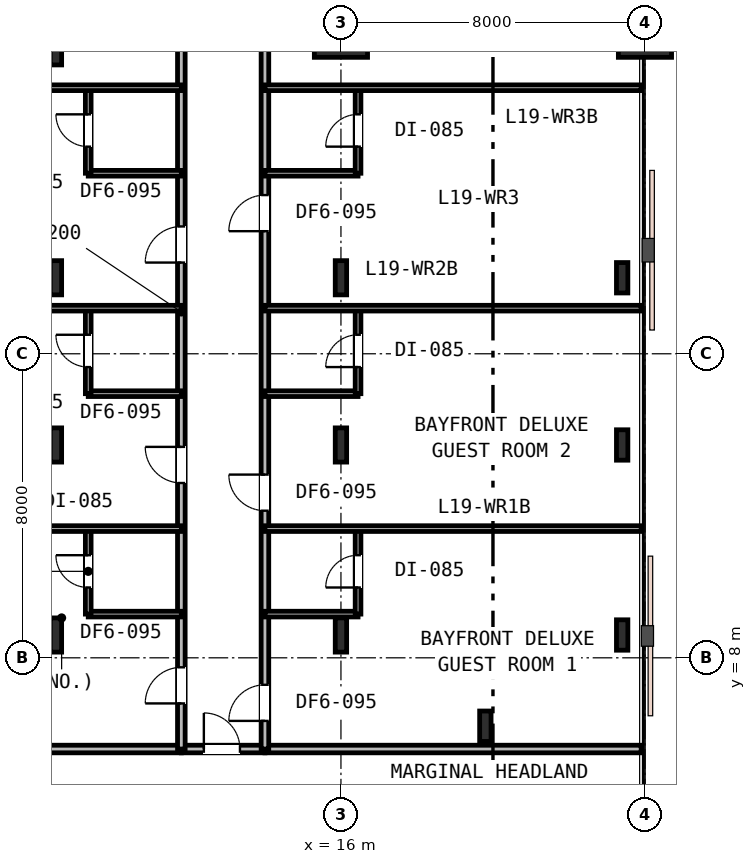
"""IFC4 building model, lengths in metres.
Left out: names, types, materials, properties, quantities, classifications, styles, units other than length and angle.
Written with IfcOpenShell. Run it as: python <this file> out.ifc"""

import sys

from ifc_helpers import new_model, si_unit, direction, frame, frame_2d, origin, origin_2d, place, context, subcontext, project, spatial, rectangle, i_section, extrude, element, fill, save


model = new_model("IFC4")
c1 = context("Model", 3, precision=1e-05, world=origin(), true_north=direction((0.0, 1.0)))
c2 = subcontext(c1, "Body", "Model", "MODEL_VIEW")
j1 = project(units=[si_unit("LENGTHUNIT", "METRE"), si_unit("PLANEANGLEUNIT", "RADIAN")], contexts=[c1])
p1 = place(None, origin())
s1 = spatial("IfcSite", under=j1, at=p1, CompositionType="ELEMENT")
p2 = place(p1, origin())
s2 = spatial("IfcBuilding", under=s1, at=p2, CompositionType="ELEMENT")
p3 = place(p2, frame((0.0, 0.0, 76.2)))
s3 = spatial("IfcBuildingStorey", under=s2, at=p3, CompositionType="ELEMENT", Elevation=76.2)
p4 = place(p3, frame((8.5, 24.0, 0.0), z_axis=(0.0, 0.0, 1.0), x_axis=(1.0, 0.0, 0.0)))
e1 = element("IfcColumn", 1, at=p4, inside=s3, PredefinedType="COLUMN", context=c2, shape_type="SweptSolid", body=[
    extrude(i_section(OverallWidth=0.3, OverallDepth=0.8, WebThickness=0.018, FlangeThickness=0.033, FilletRadius=0.03, at=origin_2d()), origin(), (0.0, 0.0, 1.0), 3.6),
])
for number, where, z_axis, x_axis in (
    (2, (16.0, 24.5, 0.0), (0.0, 0.0, 1.0), (1.0, 0.0, 0.0)),
    (3, (24.0, 24.5, 0.0), (0.0, 0.0, 1.0), (1.0, 0.0, 0.0)),
):
    element("IfcColumn", number, at=place(p3, frame(where, z_axis=z_axis, x_axis=x_axis)), inside=s3, PredefinedType="COLUMN", context=c2, shape_type="SweptSolid", body=[
        extrude(rectangle(XDim=1.4, YDim=1.4, at=origin_2d()), origin(), (0.0, 0.0, 1.0), 3.6),
    ])
for number, where, z_axis, x_axis in (
    (4, (19.8, 6.2, 0.0), (0.0, 0.0, 1.0), (1.0, 0.0, 0.0)),
    (5, (23.4, 8.6, 0.0), (0.0, 0.0, 1.0), (1.0, 0.0, 0.0)),
    (6, (23.4, 13.6, 0.0), (0.0, 0.0, 1.0), (1.0, 0.0, 0.0)),
    (7, (23.4, 18.0, 0.0), (0.0, 0.0, 1.0), (1.0, 0.0, 0.0)),
):
    element("IfcColumn", number, at=place(p3, frame(where, z_axis=z_axis, x_axis=x_axis)), inside=s3, PredefinedType="COLUMN", context=c2, shape_type="SweptSolid", body=[
        extrude(i_section(OverallWidth=0.3, OverallDepth=0.8, WebThickness=0.018, FlangeThickness=0.033, FilletRadius=0.03, at=origin_2d()), origin(), (0.0, 0.0, 1.0), 3.6),
    ])
for number, where, z_axis, x_axis in (
    (8, (8.5, 8.6, 0.0), (0.0, 0.0, 1.0), (1.0, 0.0, 0.0)),
    (9, (16.0, 8.6, 0.0), (0.0, 0.0, 1.0), (1.0, 0.0, 0.0)),
    (10, (8.5, 13.6, 0.0), (0.0, 0.0, 1.0), (1.0, 0.0, 0.0)),
    (11, (16.0, 13.6, 0.0), (0.0, 0.0, 1.0), (1.0, 0.0, 0.0)),
    (12, (8.5, 18.0, 0.0), (0.0, 0.0, 1.0), (1.0, 0.0, 0.0)),
    (13, (16.0, 18.0, 0.0), (0.0, 0.0, 1.0), (1.0, 0.0, 0.0)),
):
    element("IfcColumn", number, at=place(p3, frame(where, z_axis=z_axis, x_axis=x_axis)), inside=s3, PredefinedType="COLUMN", context=c2, shape_type="SweptSolid", body=[
        extrude(i_section(OverallWidth=0.3, OverallDepth=0.9, WebThickness=0.018, FlangeThickness=0.035, FilletRadius=0.03, at=origin_2d()), origin(), (0.0, 0.0, 1.0), 3.6),
    ])
p5 = place(p3, frame((0.1, 5.6, 0.0), z_axis=(0.0, 0.0, 1.0), x_axis=(1.0, 0.0, 0.0)))
e14 = element("IfcWall", 14, at=p5, inside=s3, PredefinedType="PARTITIONING", context=c2, shape_type="SweptSolid", body=[
    extrude(rectangle(XDim=11.7, YDim=0.2, at=frame_2d((5.85, 0.0))), origin(), (0.0, 0.0, 1.0), 2.83),
])
p6 = place(p3, frame((14.0, 5.6, 0.0), z_axis=(0.0, 0.0, 1.0), x_axis=(1.0, 0.0, 0.0)))
e15 = element("IfcWall", 15, at=p6, inside=s3, PredefinedType="PARTITIONING", context=c2, shape_type="SweptSolid", body=[
    extrude(rectangle(XDim=9.9, YDim=0.2, at=frame_2d((4.95, 0.0))), origin(), (0.0, 0.0, 1.0), 2.74),
])
p7 = place(p3, frame((11.8, 5.6, 0.0), z_axis=(0.0, 0.0, 1.0), x_axis=(1.0, 0.0, 0.0)))
e16 = element("IfcWall", 16, at=p7, inside=s3, PredefinedType="PARTITIONING", context=c2, shape_type="SweptSolid", body=[
    extrude(rectangle(XDim=2.2, YDim=0.2, at=frame_2d((1.1, 0.0))), origin(), (0.0, 0.0, 1.0), 3.24),
])
p8 = place(p7, frame((0.593, 0.0, 0.0)))
e17 = element("IfcOpeningElement", 17, at=p8, cuts=e16, PredefinedType="OPENING", context=c2, shape_type="SweptSolid", body=[
    extrude(rectangle(XDim=0.95, YDim=2.15, at=frame_2d((0.475, 1.075))), frame((0.0, 0.11, 0.0), z_axis=(0.0, -1.0, 0.0), x_axis=(1.0, 0.0, 0.0)), (0.0, 0.0, 1.0), 0.22),
])
p9 = place(p3, frame((11.8, 5.6, 0.0), z_axis=(0.0, 0.0, 1.0), x_axis=(0.0, 1.0, 0.0)))
e18 = element("IfcWall", 18, at=p9, inside=s3, PredefinedType="PARTITIONING", context=c2, shape_type="SweptSolid", body=[
    extrude(rectangle(XDim=23.0, YDim=0.2, at=frame_2d((11.5, 0.0))), origin(), (0.0, 0.0, 1.0), 2.74),
])
p10 = place(p9, frame((1.2, 0.0, 0.0)))
e19 = element("IfcOpeningElement", 19, at=p10, cuts=e18, PredefinedType="OPENING", context=c2, shape_type="SweptSolid", body=[
    extrude(rectangle(XDim=0.95, YDim=2.15, at=frame_2d((0.475, 1.075))), frame((0.0, 0.11, 0.0), z_axis=(0.0, -1.0, 0.0), x_axis=(1.0, 0.0, 0.0)), (0.0, 0.0, 1.0), 0.22),
])
p11 = place(p9, frame((7.0, 0.0, 0.0)))
e20 = element("IfcOpeningElement", 20, at=p11, cuts=e18, PredefinedType="OPENING", context=c2, shape_type="SweptSolid", body=[
    extrude(rectangle(XDim=0.95, YDim=2.15, at=frame_2d((0.475, 1.075))), frame((0.0, 0.11, 0.0), z_axis=(0.0, -1.0, 0.0), x_axis=(1.0, 0.0, 0.0)), (0.0, 0.0, 1.0), 0.22),
])
p12 = place(p9, frame((12.8, 0.0, 0.0)))
e21 = element("IfcOpeningElement", 21, at=p12, cuts=e18, PredefinedType="OPENING", context=c2, shape_type="SweptSolid", body=[
    extrude(rectangle(XDim=0.95, YDim=2.15, at=frame_2d((0.475, 1.075))), frame((0.0, 0.11, 0.0), z_axis=(0.0, -1.0, 0.0), x_axis=(1.0, 0.0, 0.0)), (0.0, 0.0, 1.0), 0.22),
])
p13 = place(p9, frame((18.515, 0.0, 0.0)))
e22 = element("IfcOpeningElement", 22, at=p13, cuts=e18, PredefinedType="OPENING", context=c2, shape_type="SweptSolid", body=[
    extrude(rectangle(XDim=0.95, YDim=2.15, at=frame_2d((0.475, 1.075))), frame((0.0, 0.11, 0.0), z_axis=(0.0, -1.0, 0.0), x_axis=(1.0, 0.0, 0.0)), (0.0, 0.0, 1.0), 0.22),
])
p14 = place(p3, frame((9.35, 9.15, 0.0), z_axis=(0.0, 0.0, 1.0), x_axis=(1.0, 0.0, 0.0)))
e23 = element("IfcWall", 23, at=p14, inside=s3, PredefinedType="PARTITIONING", context=c2, shape_type="SweptSolid", body=[
    extrude(rectangle(XDim=2.45, YDim=0.15, at=frame_2d((1.225, 0.0))), origin(), (0.0, 0.0, 1.0), 2.93),
])
p15 = place(p3, frame((9.35, 9.15, 0.0), z_axis=(0.0, 0.0, 1.0), x_axis=(0.0, 1.0, 0.0)))
e24 = element("IfcWall", 24, at=p15, inside=s3, PredefinedType="PARTITIONING", context=c2, shape_type="SweptSolid", body=[
    extrude(rectangle(XDim=2.25, YDim=0.15, at=frame_2d((1.125, 0.0))), origin(), (0.0, 0.0, 1.0), 3.24),
])
p16 = place(p15, frame((0.7, 0.0, 0.0)))
e25 = element("IfcOpeningElement", 25, at=p16, cuts=e24, PredefinedType="OPENING", context=c2, shape_type="SweptSolid", body=[
    extrude(rectangle(XDim=0.85, YDim=2.15, at=frame_2d((0.425, 1.075))), frame((0.0, 0.085, 0.0), z_axis=(0.0, -1.0, 0.0), x_axis=(1.0, 0.0, 0.0)), (0.0, 0.0, 1.0), 0.17),
])
p17 = place(p3, frame((0.1, 11.4, 0.0), z_axis=(0.0, 0.0, 1.0), x_axis=(1.0, 0.0, 0.0)))
e26 = element("IfcWall", 26, at=p17, inside=s3, PredefinedType="PARTITIONING", context=c2, shape_type="SweptSolid", body=[
    extrude(rectangle(XDim=11.7, YDim=0.15, at=frame_2d((5.85, 0.0))), origin(), (0.0, 0.0, 1.0), 2.74),
])
p18 = place(p3, frame((14.0, 5.6, 0.0), z_axis=(0.0, 0.0, 1.0), x_axis=(0.0, 1.0, 0.0)))
e27 = element("IfcWall", 27, at=p18, inside=s3, PredefinedType="PARTITIONING", context=c2, shape_type="SweptSolid", body=[
    extrude(rectangle(XDim=23.0, YDim=0.2, at=frame_2d((11.5, 0.0))), origin(), (0.0, 0.0, 1.0), 2.74),
])
p19 = place(p18, frame((0.74, 0.0, 0.0)))
e28 = element("IfcOpeningElement", 28, at=p19, cuts=e27, PredefinedType="OPENING", context=c2, shape_type="SweptSolid", body=[
    extrude(rectangle(XDim=0.95, YDim=2.15, at=frame_2d((0.475, 1.075))), frame((0.0, 0.11, 0.0), z_axis=(0.0, -1.0, 0.0), x_axis=(1.0, 0.0, 0.0)), (0.0, 0.0, 1.0), 0.22),
])
p20 = place(p18, frame((6.271, 0.0, 0.0)))
e29 = element("IfcOpeningElement", 29, at=p20, cuts=e27, PredefinedType="OPENING", context=c2, shape_type="SweptSolid", body=[
    extrude(rectangle(XDim=0.95, YDim=2.15, at=frame_2d((0.475, 1.075))), frame((0.0, 0.11, 0.0), z_axis=(0.0, -1.0, 0.0), x_axis=(1.0, 0.0, 0.0)), (0.0, 0.0, 1.0), 0.22),
])
p21 = place(p18, frame((13.626, 0.0, 0.0)))
e30 = element("IfcOpeningElement", 30, at=p21, cuts=e27, PredefinedType="OPENING", context=c2, shape_type="SweptSolid", body=[
    extrude(rectangle(XDim=0.95, YDim=2.15, at=frame_2d((0.475, 1.075))), frame((0.0, 0.11, 0.0), z_axis=(0.0, -1.0, 0.0), x_axis=(1.0, 0.0, 0.0)), (0.0, 0.0, 1.0), 0.22),
])
p22 = place(p18, frame((20.393, 0.0, 0.0)))
e31 = element("IfcOpeningElement", 31, at=p22, cuts=e27, PredefinedType="OPENING", context=c2, shape_type="SweptSolid", body=[
    extrude(rectangle(XDim=0.95, YDim=2.15, at=frame_2d((0.475, 1.075))), frame((0.0, 0.11, 0.0), z_axis=(0.0, -1.0, 0.0), x_axis=(1.0, 0.0, 0.0)), (0.0, 0.0, 1.0), 0.22),
])
p23 = place(p3, frame((14.0, 9.15, 0.0), z_axis=(0.0, 0.0, 1.0), x_axis=(1.0, 0.0, 0.0)))
e32 = element("IfcWall", 32, at=p23, inside=s3, PredefinedType="PARTITIONING", context=c2, shape_type="SweptSolid", body=[
    extrude(rectangle(XDim=2.45, YDim=0.15, at=frame_2d((1.225, 0.0))), origin(), (0.0, 0.0, 1.0), 2.74),
])
p24 = place(p3, frame((16.45, 9.15, 0.0), z_axis=(0.0, 0.0, 1.0), x_axis=(0.0, 1.0, 0.0)))
e33 = element("IfcWall", 33, at=p24, inside=s3, PredefinedType="PARTITIONING", context=c2, shape_type="SweptSolid", body=[
    extrude(rectangle(XDim=2.25, YDim=0.15, at=frame_2d((1.125, 0.0))), origin(), (0.0, 0.0, 1.0), 2.74),
])
p25 = place(p24, frame((0.7, 0.0, 0.0)))
e34 = element("IfcOpeningElement", 34, at=p25, cuts=e33, PredefinedType="OPENING", context=c2, shape_type="SweptSolid", body=[
    extrude(rectangle(XDim=0.85, YDim=2.15, at=frame_2d((0.425, 1.075))), frame((0.0, 0.085, 0.0), z_axis=(0.0, -1.0, 0.0), x_axis=(1.0, 0.0, 0.0)), (0.0, 0.0, 1.0), 0.17),
])
p26 = place(p3, frame((14.0, 11.4, 0.0), z_axis=(0.0, 0.0, 1.0), x_axis=(1.0, 0.0, 0.0)))
e35 = element("IfcWall", 35, at=p26, inside=s3, PredefinedType="PARTITIONING", context=c2, shape_type="SweptSolid", body=[
    extrude(rectangle(XDim=9.9, YDim=0.15, at=frame_2d((4.95, 0.0))), origin(), (0.0, 0.0, 1.0), 2.74),
])
p27 = place(p3, frame((9.35, 14.95, 0.0), z_axis=(0.0, 0.0, 1.0), x_axis=(1.0, 0.0, 0.0)))
e36 = element("IfcWall", 36, at=p27, inside=s3, PredefinedType="PARTITIONING", context=c2, shape_type="SweptSolid", body=[
    extrude(rectangle(XDim=2.45, YDim=0.15, at=frame_2d((1.225, 0.0))), origin(), (0.0, 0.0, 1.0), 2.93),
])
p28 = place(p3, frame((9.35, 14.95, 0.0), z_axis=(0.0, 0.0, 1.0), x_axis=(0.0, 1.0, 0.0)))
e37 = element("IfcWall", 37, at=p28, inside=s3, PredefinedType="PARTITIONING", context=c2, shape_type="SweptSolid", body=[
    extrude(rectangle(XDim=2.25, YDim=0.15, at=frame_2d((1.125, 0.0))), origin(), (0.0, 0.0, 1.0), 3.24),
])
p29 = place(p28, frame((0.7, 0.0, 0.0)))
e38 = element("IfcOpeningElement", 38, at=p29, cuts=e37, PredefinedType="OPENING", context=c2, shape_type="SweptSolid", body=[
    extrude(rectangle(XDim=0.85, YDim=2.15, at=frame_2d((0.425, 1.075))), frame((0.0, 0.085, 0.0), z_axis=(0.0, -1.0, 0.0), x_axis=(1.0, 0.0, 0.0)), (0.0, 0.0, 1.0), 0.17),
])
p30 = place(p3, frame((0.1, 17.2, 0.0), z_axis=(0.0, 0.0, 1.0), x_axis=(1.0, 0.0, 0.0)))
e39 = element("IfcWall", 39, at=p30, inside=s3, PredefinedType="PARTITIONING", context=c2, shape_type="SweptSolid", body=[
    extrude(rectangle(XDim=11.7, YDim=0.15, at=frame_2d((5.85, 0.0))), origin(), (0.0, 0.0, 1.0), 2.74),
])
p31 = place(p3, frame((14.0, 14.95, 0.0), z_axis=(0.0, 0.0, 1.0), x_axis=(1.0, 0.0, 0.0)))
e40 = element("IfcWall", 40, at=p31, inside=s3, PredefinedType="PARTITIONING", context=c2, shape_type="SweptSolid", body=[
    extrude(rectangle(XDim=2.45, YDim=0.15, at=frame_2d((1.225, 0.0))), origin(), (0.0, 0.0, 1.0), 2.74),
])
p32 = place(p3, frame((16.45, 14.95, 0.0), z_axis=(0.0, 0.0, 1.0), x_axis=(0.0, 1.0, 0.0)))
e41 = element("IfcWall", 41, at=p32, inside=s3, PredefinedType="PARTITIONING", context=c2, shape_type="SweptSolid", body=[
    extrude(rectangle(XDim=2.25, YDim=0.15, at=frame_2d((1.125, 0.0))), origin(), (0.0, 0.0, 1.0), 2.74),
])
p33 = place(p32, frame((0.7, 0.0, 0.0)))
e42 = element("IfcOpeningElement", 42, at=p33, cuts=e41, PredefinedType="OPENING", context=c2, shape_type="SweptSolid", body=[
    extrude(rectangle(XDim=0.85, YDim=2.15, at=frame_2d((0.425, 1.075))), frame((0.0, 0.085, 0.0), z_axis=(0.0, -1.0, 0.0), x_axis=(1.0, 0.0, 0.0)), (0.0, 0.0, 1.0), 0.17),
])
p34 = place(p3, frame((14.0, 17.2, 0.0), z_axis=(0.0, 0.0, 1.0), x_axis=(1.0, 0.0, 0.0)))
e43 = element("IfcWall", 43, at=p34, inside=s3, PredefinedType="PARTITIONING", context=c2, shape_type="SweptSolid", body=[
    extrude(rectangle(XDim=9.9, YDim=0.15, at=frame_2d((4.95, 0.0))), origin(), (0.0, 0.0, 1.0), 2.74),
])
p35 = place(p3, frame((9.35, 20.75, 0.0), z_axis=(0.0, 0.0, 1.0), x_axis=(1.0, 0.0, 0.0)))
e44 = element("IfcWall", 44, at=p35, inside=s3, PredefinedType="PARTITIONING", context=c2, shape_type="SweptSolid", body=[
    extrude(rectangle(XDim=2.45, YDim=0.15, at=frame_2d((1.225, 0.0))), origin(), (0.0, 0.0, 1.0), 3.24),
])
p36 = place(p3, frame((9.35, 20.75, 0.0), z_axis=(0.0, 0.0, 1.0), x_axis=(0.0, 1.0, 0.0)))
e45 = element("IfcWall", 45, at=p36, inside=s3, PredefinedType="PARTITIONING", context=c2, shape_type="SweptSolid", body=[
    extrude(rectangle(XDim=2.25, YDim=0.15, at=frame_2d((1.125, 0.0))), origin(), (0.0, 0.0, 1.0), 3.24),
])
p37 = place(p36, frame((0.7, 0.0, 0.0)))
e46 = element("IfcOpeningElement", 46, at=p37, cuts=e45, PredefinedType="OPENING", context=c2, shape_type="SweptSolid", body=[
    extrude(rectangle(XDim=0.85, YDim=2.15, at=frame_2d((0.425, 1.075))), frame((0.0, 0.085, 0.0), z_axis=(0.0, -1.0, 0.0), x_axis=(1.0, 0.0, 0.0)), (0.0, 0.0, 1.0), 0.17),
])
p38 = place(p3, frame((0.1, 23.0, 0.0), z_axis=(0.0, 0.0, 1.0), x_axis=(1.0, 0.0, 0.0)))
e47 = element("IfcWall", 47, at=p38, inside=s3, PredefinedType="PARTITIONING", context=c2, shape_type="SweptSolid", body=[
    extrude(rectangle(XDim=11.7, YDim=0.15, at=frame_2d((5.85, 0.0))), origin(), (0.0, 0.0, 1.0), 2.74),
])
p39 = place(p3, frame((14.0, 20.75, 0.0), z_axis=(0.0, 0.0, 1.0), x_axis=(1.0, 0.0, 0.0)))
e48 = element("IfcWall", 48, at=p39, inside=s3, PredefinedType="PARTITIONING", context=c2, shape_type="SweptSolid", body=[
    extrude(rectangle(XDim=2.45, YDim=0.15, at=frame_2d((1.225, 0.0))), origin(), (0.0, 0.0, 1.0), 2.74),
])
p40 = place(p3, frame((16.45, 20.75, 0.0), z_axis=(0.0, 0.0, 1.0), x_axis=(0.0, 1.0, 0.0)))
e49 = element("IfcWall", 49, at=p40, inside=s3, PredefinedType="PARTITIONING", context=c2, shape_type="SweptSolid", body=[
    extrude(rectangle(XDim=2.25, YDim=0.15, at=frame_2d((1.125, 0.0))), origin(), (0.0, 0.0, 1.0), 2.74),
])
p41 = place(p40, frame((0.7, 0.0, 0.0)))
e50 = element("IfcOpeningElement", 50, at=p41, cuts=e49, PredefinedType="OPENING", context=c2, shape_type="SweptSolid", body=[
    extrude(rectangle(XDim=0.85, YDim=2.15, at=frame_2d((0.425, 1.075))), frame((0.0, 0.085, 0.0), z_axis=(0.0, -1.0, 0.0), x_axis=(1.0, 0.0, 0.0)), (0.0, 0.0, 1.0), 0.17),
])
p42 = place(p3, frame((14.0, 23.0, 0.0), z_axis=(0.0, 0.0, 1.0), x_axis=(1.0, 0.0, 0.0)))
e51 = element("IfcWall", 51, at=p42, inside=s3, PredefinedType="PARTITIONING", context=c2, shape_type="SweptSolid", body=[
    extrude(rectangle(XDim=9.9, YDim=0.15, at=frame_2d((4.95, 0.0))), origin(), (0.0, 0.0, 1.0), 2.74),
])
p43 = place(p8, origin())
e52 = element("IfcDoor", 52, at=p43, inside=s3, OperationType="SINGLE_SWING_LEFT", PredefinedType="DOOR", context=c2, shape_type="SweptSolid", body=[
    extrude(rectangle(XDim=0.95, YDim=2.15, at=frame_2d((0.475, 1.075))), frame((0.0, 0.025, 0.0), z_axis=(0.0, -1.0, 0.0), x_axis=(1.0, 0.0, 0.0)), (0.0, 0.0, 1.0), 0.05),
])
fill(e17, e52)
p44 = place(p10, origin())
e53 = element("IfcDoor", 53, at=p44, inside=s3, OperationType="SINGLE_SWING_LEFT", PredefinedType="DOOR", context=c2, shape_type="SweptSolid", body=[
    extrude(rectangle(XDim=0.95, YDim=2.15, at=frame_2d((0.475, 1.075))), frame((0.0, 0.025, 0.0), z_axis=(0.0, -1.0, 0.0), x_axis=(1.0, 0.0, 0.0)), (0.0, 0.0, 1.0), 0.05),
])
fill(e19, e53)
p45 = place(p16, origin())
e54 = element("IfcDoor", 54, at=p45, inside=s3, OperationType="SINGLE_SWING_RIGHT", PredefinedType="DOOR", context=c2, shape_type="SweptSolid", body=[
    extrude(rectangle(XDim=0.85, YDim=2.15, at=frame_2d((0.425, 1.075))), frame((0.0, 0.025, 0.0), z_axis=(0.0, -1.0, 0.0), x_axis=(1.0, 0.0, 0.0)), (0.0, 0.0, 1.0), 0.05),
])
fill(e25, e54)
p46 = place(p19, origin())
e55 = element("IfcDoor", 55, at=p46, inside=s3, OperationType="SINGLE_SWING_LEFT", PredefinedType="DOOR", context=c2, shape_type="SweptSolid", body=[
    extrude(rectangle(XDim=0.95, YDim=2.15, at=frame_2d((0.475, 1.075))), frame((0.0, 0.025, 0.0), z_axis=(0.0, -1.0, 0.0), x_axis=(1.0, 0.0, 0.0)), (0.0, 0.0, 1.0), 0.05),
])
fill(e28, e55)
p47 = place(p25, origin())
e56 = element("IfcDoor", 56, at=p47, inside=s3, OperationType="SINGLE_SWING_LEFT", PredefinedType="DOOR", context=c2, shape_type="SweptSolid", body=[
    extrude(rectangle(XDim=0.85, YDim=2.15, at=frame_2d((0.425, 1.075))), frame((0.0, 0.025, 0.0), z_axis=(0.0, -1.0, 0.0), x_axis=(1.0, 0.0, 0.0)), (0.0, 0.0, 1.0), 0.05),
])
fill(e34, e56)
p48 = place(p11, origin())
e57 = element("IfcDoor", 57, at=p48, inside=s3, OperationType="SINGLE_SWING_RIGHT", PredefinedType="DOOR", context=c2, shape_type="SweptSolid", body=[
    extrude(rectangle(XDim=0.95, YDim=2.15, at=frame_2d((0.475, 1.075))), frame((0.0, 0.025, 0.0), z_axis=(0.0, -1.0, 0.0), x_axis=(1.0, 0.0, 0.0)), (0.0, 0.0, 1.0), 0.05),
])
fill(e20, e57)
p49 = place(p29, origin())
e58 = element("IfcDoor", 58, at=p49, inside=s3, OperationType="SINGLE_SWING_RIGHT", PredefinedType="DOOR", context=c2, shape_type="SweptSolid", body=[
    extrude(rectangle(XDim=0.85, YDim=2.15, at=frame_2d((0.425, 1.075))), frame((0.0, 0.025, 0.0), z_axis=(0.0, -1.0, 0.0), x_axis=(1.0, 0.0, 0.0)), (0.0, 0.0, 1.0), 0.05),
])
fill(e38, e58)
p50 = place(p20, origin())
e59 = element("IfcDoor", 59, at=p50, inside=s3, OperationType="SINGLE_SWING_RIGHT", PredefinedType="DOOR", context=c2, shape_type="SweptSolid", body=[
    extrude(rectangle(XDim=0.95, YDim=2.15, at=frame_2d((0.475, 1.075))), frame((0.0, 0.025, 0.0), z_axis=(0.0, -1.0, 0.0), x_axis=(1.0, 0.0, 0.0)), (0.0, 0.0, 1.0), 0.05),
])
fill(e29, e59)
p51 = place(p33, origin())
e60 = element("IfcDoor", 60, at=p51, inside=s3, OperationType="SINGLE_SWING_LEFT", PredefinedType="DOOR", context=c2, shape_type="SweptSolid", body=[
    extrude(rectangle(XDim=0.85, YDim=2.15, at=frame_2d((0.425, 1.075))), frame((0.0, 0.025, 0.0), z_axis=(0.0, -1.0, 0.0), x_axis=(1.0, 0.0, 0.0)), (0.0, 0.0, 1.0), 0.05),
])
fill(e42, e60)
p52 = place(p12, origin())
e61 = element("IfcDoor", 61, at=p52, inside=s3, OperationType="SINGLE_SWING_LEFT", PredefinedType="DOOR", context=c2, shape_type="SweptSolid", body=[
    extrude(rectangle(XDim=0.95, YDim=2.15, at=frame_2d((0.475, 1.075))), frame((0.0, 0.025, 0.0), z_axis=(0.0, -1.0, 0.0), x_axis=(1.0, 0.0, 0.0)), (0.0, 0.0, 1.0), 0.05),
])
fill(e21, e61)
p53 = place(p37, origin())
e62 = element("IfcDoor", 62, at=p53, inside=s3, OperationType="SINGLE_SWING_RIGHT", PredefinedType="DOOR", context=c2, shape_type="SweptSolid", body=[
    extrude(rectangle(XDim=0.85, YDim=2.15, at=frame_2d((0.425, 1.075))), frame((0.0, 0.025, 0.0), z_axis=(0.0, -1.0, 0.0), x_axis=(1.0, 0.0, 0.0)), (0.0, 0.0, 1.0), 0.05),
])
fill(e46, e62)
p54 = place(p21, origin())
e63 = element("IfcDoor", 63, at=p54, inside=s3, OperationType="SINGLE_SWING_LEFT", PredefinedType="DOOR", context=c2, shape_type="SweptSolid", body=[
    extrude(rectangle(XDim=0.95, YDim=2.15, at=frame_2d((0.475, 1.075))), frame((0.0, 0.025, 0.0), z_axis=(0.0, -1.0, 0.0), x_axis=(1.0, 0.0, 0.0)), (0.0, 0.0, 1.0), 0.05),
])
fill(e30, e63)
p55 = place(p41, origin())
e64 = element("IfcDoor", 64, at=p55, inside=s3, OperationType="SINGLE_SWING_LEFT", PredefinedType="DOOR", context=c2, shape_type="SweptSolid", body=[
    extrude(rectangle(XDim=0.85, YDim=2.15, at=frame_2d((0.425, 1.075))), frame((0.0, 0.025, 0.0), z_axis=(0.0, -1.0, 0.0), x_axis=(1.0, 0.0, 0.0)), (0.0, 0.0, 1.0), 0.05),
])
fill(e50, e64)
save(model, sys.argv[1])
